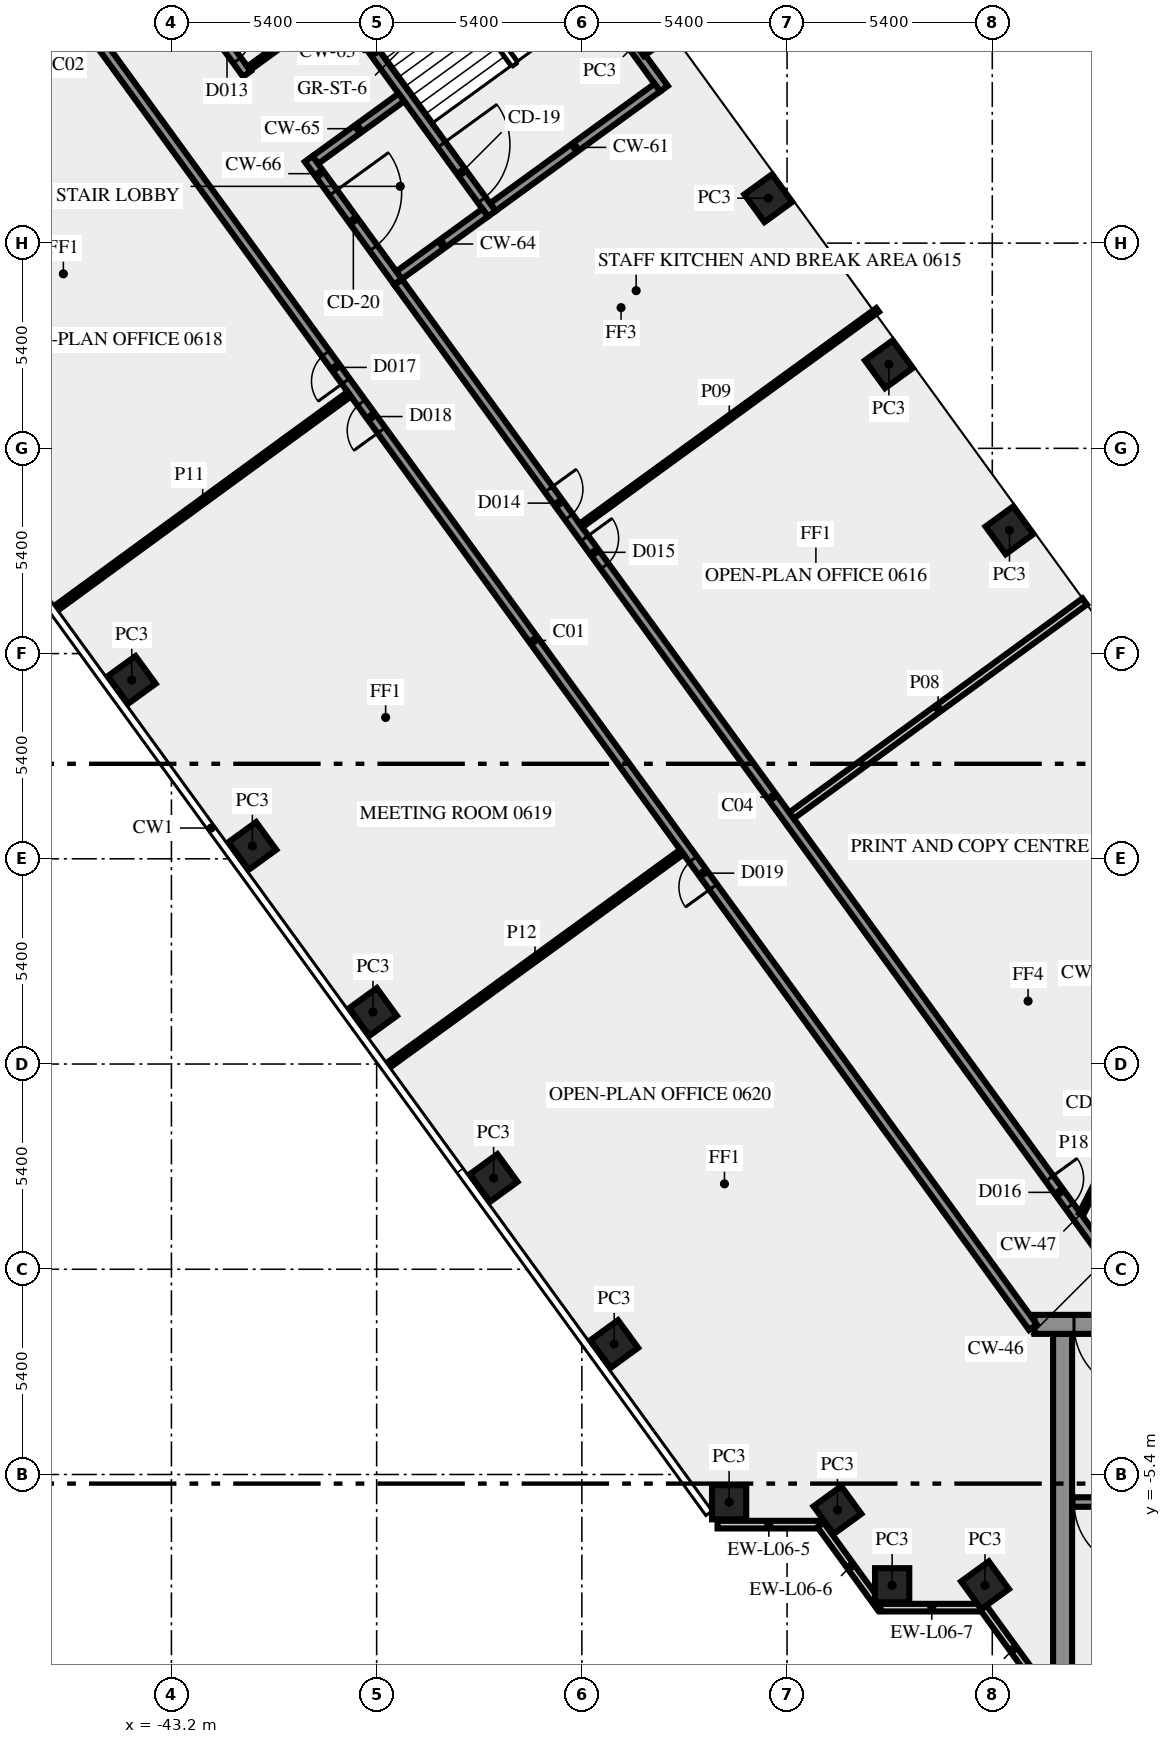
"""IFC4 building model, lengths in metres.
Left out: names, types, materials, properties, quantities, classifications, styles, units other than length and angle.
Written with IfcOpenShell. Run it as: python <this file> out.ifc"""

import sys

from ifc_helpers import new_model, si_unit, direction, frame, frame_2d, origin, origin_2d, place, context, subcontext, project, spatial, rectangle, extrude, element, fill, save


model = new_model("IFC4")
c1 = context("Model", 3, precision=1e-05, world=origin(), true_north=direction((0.0, 1.0)))
c2 = subcontext(c1, "Body", "Model", "MODEL_VIEW")
j1 = project(units=[si_unit("LENGTHUNIT", "METRE"), si_unit("PLANEANGLEUNIT", "RADIAN")], contexts=[c1])
p1 = place(None, origin())
s1 = spatial("IfcSite", under=j1, at=p1, CompositionType="ELEMENT")
p2 = place(p1, origin())
s2 = spatial("IfcBuilding", under=s1, at=p2, CompositionType="ELEMENT")
p3 = place(p2, frame((0.0, 0.0, 31.0)))
s3 = spatial("IfcBuildingStorey", under=s2, at=p3, CompositionType="ELEMENT", Elevation=31.0)
for number, where, z_axis, x_axis in (
    (1, (-21.147, 19.444, 0.0), (0.0, 0.0, 1.0), (-0.588, 0.809, 0.0)),
    (2, (-24.321, 23.812, 0.0), (0.0, 0.0, 1.0), (-0.588, 0.809, 0.0)),
    (3, (-27.495, 28.181, 0.0), (0.0, 0.0, 1.0), (-0.588, 0.809, 0.0)),
    (4, (-30.669, 32.55, 0.0), (0.0, 0.0, 1.0), (-0.588, 0.809, 0.0)),
    (5, (-44.244, 15.506, 0.0), (0.0, 0.0, 1.0), (0.588, -0.809, 0.0)),
    (6, (-41.07, 11.137, 0.0), (0.0, 0.0, 1.0), (0.588, -0.809, 0.0)),
    (7, (-37.896, 6.769, 0.0), (0.0, 0.0, 1.0), (0.588, -0.809, 0.0)),
    (8, (-34.722, 2.4, 0.0), (0.0, 0.0, 1.0), (0.588, -0.809, 0.0)),
    (9, (-31.548, -1.969, 0.0), (0.0, 0.0, 1.0), (0.588, -0.809, 0.0)),
    (10, (-28.525, -6.13, 0.0), (0.0, 0.0, 1.0), (1.0, 0.0, 0.0)),
    (11, (-25.674, -6.337, 0.0), (0.0, 0.0, 1.0), (0.588, -0.809, 0.0)),
    (12, (-24.235, -8.315, 0.0), (0.0, 0.0, 1.0), (1.0, 0.0, 0.0)),
    (13, (-21.792, -8.315, 0.0), (0.0, 0.0, 1.0), (0.588, -0.809, 0.0)),
):
    element("IfcColumn", number, at=place(p3, frame(where, z_axis=z_axis, x_axis=x_axis)), inside=s3, PredefinedType="COLUMN", context=c2, shape_type="SweptSolid", body=[
        extrude(rectangle(XDim=0.9, YDim=0.9, at=origin_2d()), origin(), (0.0, 0.0, 1.0), 3.65),
    ])
p4 = place(p3, frame((-28.83, -6.719, 0.0), z_axis=(0.0, 0.0, 1.0), x_axis=(1.0, 0.0, 0.0)))
e14 = element("IfcWall", 14, at=p4, inside=s3, PredefinedType="SOLIDWALL", context=c2, shape_type="SweptSolid", body=[
    extrude(rectangle(XDim=2.7, YDim=0.2, at=frame_2d((1.35, 0.0))), origin(), (0.0, 0.0, 1.0), 3.65),
])
p5 = place(p3, frame((-26.12, -6.724, 0.0), z_axis=(0.0, 0.0, 1.0), x_axis=(0.587720002413, -0.809064397168, 0.0)))
e15 = element("IfcWall", 15, at=p5, inside=s3, PredefinedType="SOLIDWALL", context=c2, shape_type="SweptSolid", body=[
    extrude(rectangle(XDim=2.7, YDim=0.2, at=frame_2d((1.35, 0.0))), origin(), (0.0, 0.0, 1.0), 3.65),
])
p6 = place(p3, frame((-24.543, -8.904, 0.0), z_axis=(0.0, 0.0, 1.0), x_axis=(1.0, 0.0, 0.0)))
e16 = element("IfcWall", 16, at=p6, inside=s3, PredefinedType="SOLIDWALL", context=c2, shape_type="SweptSolid", body=[
    extrude(rectangle(XDim=2.7, YDim=0.2, at=frame_2d((1.35, 0.0))), origin(), (0.0, 0.0, 1.0), 3.65),
])
p7 = place(p3, frame((-21.833, -8.909, 0.0), z_axis=(0.0, 0.0, 1.0), x_axis=(0.587766567315, -0.809030569476, 0.0)))
e17 = element("IfcWall", 17, at=p7, inside=s3, PredefinedType="SOLIDWALL", context=c2, shape_type="SweptSolid", body=[
    extrude(rectangle(XDim=2.688, YDim=0.2, at=frame_2d((1.344, 0.0))), origin(), (0.0, 0.0, 1.0), 3.65),
])
p8 = place(p3, frame((-19.75, -10.5, 0.0), z_axis=(0.0, 0.0, 1.0), x_axis=(0.0, 1.0, 0.0)))
e18 = element("IfcWall", 18, at=p8, inside=s3, PredefinedType="SHEAR", context=c2, shape_type="SweptSolid", body=[
    extrude(rectangle(XDim=8.8, YDim=0.5, at=frame_2d((4.4, 0.0))), origin(), (0.0, 0.0, 1.0), 3.65),
])
p9 = place(p3, frame((-11.45, -6.125, 0.0), z_axis=(0.0, 0.0, 1.0), x_axis=(-1.0, 0.0, 0.0)))
e19 = element("IfcWall", 19, at=p9, inside=s3, PredefinedType="SHEAR", context=c2, shape_type="SweptSolid", body=[
    extrude(rectangle(XDim=8.05, YDim=0.25, at=frame_2d((4.025, 0.0))), origin(), (0.0, 0.0, 1.0), 3.65),
])
p10 = place(p9, frame((6.2, 0.0, 0.0)))
e20 = element("IfcOpeningElement", 20, at=p10, cuts=e19, PredefinedType="OPENING", context=c2, shape_type="SweptSolid", body=[
    extrude(rectangle(XDim=1.8, YDim=2.1, at=frame_2d((0.9, 1.05))), frame((0.0, 0.135, 0.0), z_axis=(0.0, -1.0, 0.0), x_axis=(1.0, 0.0, 0.0)), (0.0, 0.0, 1.0), 0.27),
])
p11 = place(p3, frame((20.49, -1.45, 0.0), z_axis=(0.0, 0.0, 1.0), x_axis=(-1.0, 0.0, 0.0)))
e21 = element("IfcWall", 21, at=p11, inside=s3, PredefinedType="SHEAR", context=c2, shape_type="SweptSolid", body=[
    extrude(rectangle(XDim=40.98, YDim=0.5, at=frame_2d((20.49, 0.0))), origin(), (0.0, 0.0, 1.0), 3.65),
])
p12 = place(p11, frame((38.14, 0.0, 0.0)))
e22 = element("IfcOpeningElement", 22, at=p12, cuts=e21, PredefinedType="OPENING", context=c2, shape_type="SweptSolid", body=[
    extrude(rectangle(XDim=1.8, YDim=2.1, at=frame_2d((0.9, 1.05))), frame((0.0, 0.26, 0.0), z_axis=(0.0, -1.0, 0.0), x_axis=(1.0, 0.0, 0.0)), (0.0, 0.0, 1.0), 0.52),
])
p13 = place(p11, frame((36.728, 0.0, 0.0)))
e23 = element("IfcOpeningElement", 23, at=p13, cuts=e21, PredefinedType="OPENING", context=c2, shape_type="SweptSolid", body=[
    extrude(rectangle(XDim=0.8, YDim=2.1, at=frame_2d((0.4, 1.05))), frame((0.0, 0.26, 0.0), z_axis=(0.0, -1.0, 0.0), x_axis=(1.0, 0.0, 0.0)), (0.0, 0.0, 1.0), 0.52),
])
p14 = place(p11, frame((35.153, 0.0, 0.0)))
e24 = element("IfcOpeningElement", 24, at=p14, cuts=e21, PredefinedType="OPENING", context=c2, shape_type="SweptSolid", body=[
    extrude(rectangle(XDim=0.8, YDim=2.1, at=frame_2d((0.4, 1.05))), frame((0.0, 0.26, 0.0), z_axis=(0.0, -1.0, 0.0), x_axis=(1.0, 0.0, 0.0)), (0.0, 0.0, 1.0), 0.52),
])
p15 = place(p11, frame((32.94, 0.0, 0.0)))
e25 = element("IfcOpeningElement", 25, at=p15, cuts=e21, PredefinedType="OPENING", context=c2, shape_type="SweptSolid", body=[
    extrude(rectangle(XDim=0.9, YDim=2.1, at=frame_2d((0.45, 1.05))), frame((0.0, 0.26, 0.0), z_axis=(0.0, -1.0, 0.0), x_axis=(1.0, 0.0, 0.0)), (0.0, 0.0, 1.0), 0.52),
])
p16 = place(p11, frame((21.765, 0.0, 0.0)))
e26 = element("IfcOpeningElement", 26, at=p16, cuts=e21, PredefinedType="OPENING", context=c2, shape_type="SweptSolid", body=[
    extrude(rectangle(XDim=2.0, YDim=2.1, at=frame_2d((1.0, 1.05))), frame((0.0, 0.26, 0.0), z_axis=(0.0, -1.0, 0.0), x_axis=(1.0, 0.0, 0.0)), (0.0, 0.0, 1.0), 0.52),
])
p17 = place(p11, frame((7.14, 0.0, 0.0)))
e27 = element("IfcOpeningElement", 27, at=p17, cuts=e21, PredefinedType="OPENING", context=c2, shape_type="SweptSolid", body=[
    extrude(rectangle(XDim=0.9, YDim=2.1, at=frame_2d((0.45, 1.05))), frame((0.0, 0.26, 0.0), z_axis=(0.0, -1.0, 0.0), x_axis=(1.0, 0.0, 0.0)), (0.0, 0.0, 1.0), 0.52),
])
p18 = place(p11, frame((4.19, 0.0, 0.0)))
e28 = element("IfcOpeningElement", 28, at=p18, cuts=e21, PredefinedType="OPENING", context=c2, shape_type="SweptSolid", body=[
    extrude(rectangle(XDim=0.9, YDim=2.1, at=frame_2d((0.45, 1.05))), frame((0.0, 0.26, 0.0), z_axis=(0.0, -1.0, 0.0), x_axis=(1.0, 0.0, 0.0)), (0.0, 0.0, 1.0), 0.52),
])
p19 = place(p11, frame((1.04, 0.0, 0.0)))
e29 = element("IfcOpeningElement", 29, at=p19, cuts=e21, PredefinedType="OPENING", context=c2, shape_type="SweptSolid", body=[
    extrude(rectangle(XDim=1.8, YDim=2.1, at=frame_2d((0.9, 1.05))), frame((0.0, 0.26, 0.0), z_axis=(0.0, -1.0, 0.0), x_axis=(1.0, 0.0, 0.0)), (0.0, 0.0, 1.0), 0.52),
])
p20 = place(p3, frame((-30.24, 31.064, 0.0), z_axis=(0.0, 0.0, 1.0), x_axis=(-0.587795589702, 0.809009483706, 0.0)))
e30 = element("IfcWall", 30, at=p20, inside=s3, PredefinedType="SHEAR", context=c2, shape_type="SweptSolid", body=[
    extrude(rectangle(XDim=10.5, YDim=0.25, at=frame_2d((5.25, 0.0))), origin(), (0.0, 0.0, 1.0), 3.65),
])
p21 = place(p20, frame((2.15, 0.0, 1.0)))
e31 = element("IfcOpeningElement", 31, at=p21, cuts=e30, PredefinedType="OPENING", context=c2, shape_type="SweptSolid", body=[
    extrude(rectangle(XDim=1.2, YDim=1.2, at=frame_2d((0.6, 0.6))), frame((0.0, 0.135, 0.0), z_axis=(0.0, -1.0, 0.0), x_axis=(1.0, 0.0, 0.0)), (0.0, 0.0, 1.0), 0.27),
])
p22 = place(p3, frame((-30.414, 31.092, 0.0), z_axis=(0.0, 0.0, 1.0), x_axis=(-0.8089984606, -0.587810760999, 0.0)))
e32 = element("IfcWall", 32, at=p22, inside=s3, PredefinedType="SHEAR", context=c2, shape_type="SweptSolid", body=[
    extrude(rectangle(XDim=5.35, YDim=0.25, at=frame_2d((2.675, 0.0))), origin(), (0.0, 0.0, 1.0), 3.65),
])
p23 = place(p3, frame((-40.942, 36.267, 0.0), z_axis=(0.0, 0.0, 1.0), x_axis=(0.587795589702, -0.809009483706, 0.0)))
e33 = element("IfcWall", 33, at=p23, inside=s3, PredefinedType="SHEAR", context=c2, shape_type="SweptSolid", body=[
    extrude(rectangle(XDim=10.5, YDim=0.25, at=frame_2d((5.25, 0.0))), origin(), (0.0, 0.0, 1.0), 3.65),
])
p24 = place(p23, frame((8.25, 0.0, 0.0)))
e34 = element("IfcOpeningElement", 34, at=p24, cuts=e33, PredefinedType="OPENING", context=c2, shape_type="SweptSolid", body=[
    extrude(rectangle(XDim=1.8, YDim=2.1, at=frame_2d((0.9, 1.05))), frame((0.0, 0.135, 0.0), z_axis=(0.0, -1.0, 0.0), x_axis=(1.0, 0.0, 0.0)), (0.0, 0.0, 1.0), 0.27),
])
for number, where, z_axis, x_axis in (
    (35, (-34.945, 27.8, 0.0), (0.0, 0.0, 1.0), (-0.809, -0.588, 0.0)),
    (36, (-37.149, 30.834, 0.0), (0.0, 0.0, 1.0), (-0.809, -0.588, 0.0)),
):
    element("IfcWall", number, at=place(p3, frame(where, z_axis=z_axis, x_axis=x_axis)), inside=s3, PredefinedType="SHEAR", context=c2, shape_type="SweptSolid", body=[
        extrude(rectangle(XDim=2.8, YDim=0.25, at=frame_2d((1.4, 0.0))), origin(), (0.0, 0.0, 1.0), 3.65),
    ])
p25 = place(p3, frame((-39.589, 29.216, 0.0), z_axis=(0.0, 0.0, 1.0), x_axis=(0.587772420479, -0.809026317077, 0.0)))
e37 = element("IfcWall", 37, at=p25, inside=s3, PredefinedType="SHEAR", context=c2, shape_type="SweptSolid", body=[
    extrude(rectangle(XDim=4.0, YDim=0.25, at=frame_2d((2.0, 0.0))), origin(), (0.0, 0.0, 1.0), 3.65),
])
p26 = place(p25, frame((1.1, 0.0, 0.0)))
e38 = element("IfcOpeningElement", 38, at=p26, cuts=e37, PredefinedType="OPENING", context=c2, shape_type="SweptSolid", body=[
    extrude(rectangle(XDim=1.8, YDim=2.1, at=frame_2d((0.9, 1.05))), frame((0.0, 0.135, 0.0), z_axis=(0.0, -1.0, 0.0), x_axis=(1.0, 0.0, 0.0)), (0.0, 0.0, 1.0), 0.27),
])
p27 = place(p3, frame((-20.531, -1.523, 0.0), z_axis=(0.0, 0.0, 1.0), x_axis=(-0.587784593204, 0.809017473231, 0.0)))
e39 = element("IfcWall", 39, at=p27, inside=s3, PredefinedType="SOLIDWALL", context=c2, shape_type="SweptSolid", body=[
    extrude(rectangle(XDim=44.67, YDim=0.25, at=frame_2d((22.335, 0.0))), origin(), (0.0, 0.0, 1.0), 3.65),
])
p28 = place(p27, frame((30.765, 0.0, 0.0)))
e40 = element("IfcOpeningElement", 40, at=p28, cuts=e39, PredefinedType="OPENING", context=c2, shape_type="SweptSolid", body=[
    extrude(rectangle(XDim=0.9, YDim=2.1, at=frame_2d((0.45, 1.05))), frame((0.0, 0.135, 0.0), z_axis=(0.0, -1.0, 0.0), x_axis=(1.0, 0.0, 0.0)), (0.0, 0.0, 1.0), 0.27),
])
p29 = place(p27, frame((14.316, 0.0, 0.0)))
e41 = element("IfcOpeningElement", 41, at=p29, cuts=e39, PredefinedType="OPENING", context=c2, shape_type="SweptSolid", body=[
    extrude(rectangle(XDim=0.9, YDim=2.1, at=frame_2d((0.45, 1.05))), frame((0.0, 0.135, 0.0), z_axis=(0.0, -1.0, 0.0), x_axis=(1.0, 0.0, 0.0)), (0.0, 0.0, 1.0), 0.27),
])
p30 = place(p27, frame((29.166, 0.0, 0.0)))
e42 = element("IfcOpeningElement", 42, at=p30, cuts=e39, PredefinedType="OPENING", context=c2, shape_type="SweptSolid", body=[
    extrude(rectangle(XDim=0.9, YDim=2.1, at=frame_2d((0.45, 1.05))), frame((0.0, 0.135, 0.0), z_axis=(0.0, -1.0, 0.0), x_axis=(1.0, 0.0, 0.0)), (0.0, 0.0, 1.0), 0.27),
])
p31 = place(p3, frame((-44.497, 35.971, 0.0), z_axis=(0.0, 0.0, 1.0), x_axis=(0.587742866856, -0.809047787501, 0.0)))
e43 = element("IfcWall", 43, at=p31, inside=s3, PredefinedType="SOLIDWALL", context=c2, shape_type="SweptSolid", body=[
    extrude(rectangle(XDim=5.586, YDim=0.25, at=frame_2d((2.793, 0.0))), origin(), (0.0, 0.0, 1.0), 3.65),
])
p32 = place(p31, frame((4.245, 0.0, 0.0)))
e44 = element("IfcOpeningElement", 44, at=p32, cuts=e43, PredefinedType="OPENING", context=c2, shape_type="SweptSolid", body=[
    extrude(rectangle(XDim=0.9, YDim=2.1, at=frame_2d((0.45, 1.05))), frame((0.0, 0.135, 0.0), z_axis=(0.0, -1.0, 0.0), x_axis=(1.0, 0.0, 0.0)), (0.0, 0.0, 1.0), 0.27),
])
p33 = place(p3, frame((-37.232, 25.972, 0.0), z_axis=(0.0, 0.0, 1.0), x_axis=(0.587786323093, -0.809016216391, 0.0)))
e45 = element("IfcWall", 45, at=p33, inside=s3, PredefinedType="SOLIDWALL", context=c2, shape_type="SweptSolid", body=[
    extrude(rectangle(XDim=33.493, YDim=0.25, at=frame_2d((16.747, 0.0))), origin(), (0.0, 0.0, 1.0), 3.65),
])
p34 = place(p33, frame((8.335, 0.0, 0.0)))
e46 = element("IfcOpeningElement", 46, at=p34, cuts=e45, PredefinedType="OPENING", context=c2, shape_type="SweptSolid", body=[
    extrude(rectangle(XDim=0.9, YDim=2.1, at=frame_2d((0.45, 1.05))), frame((0.0, 0.135, 0.0), z_axis=(0.0, -1.0, 0.0), x_axis=(1.0, 0.0, 0.0)), (0.0, 0.0, 1.0), 0.27),
])
p35 = place(p33, frame((29.152, 0.0, 0.0)))
e47 = element("IfcOpeningElement", 47, at=p35, cuts=e45, PredefinedType="OPENING", context=c2, shape_type="SweptSolid", body=[
    extrude(rectangle(XDim=0.9, YDim=2.1, at=frame_2d((0.45, 1.05))), frame((0.0, 0.135, 0.0), z_axis=(0.0, -1.0, 0.0), x_axis=(1.0, 0.0, 0.0)), (0.0, 0.0, 1.0), 0.27),
])
p36 = place(p33, frame((6.735, 0.0, 0.0)))
e48 = element("IfcOpeningElement", 48, at=p36, cuts=e45, PredefinedType="OPENING", context=c2, shape_type="SweptSolid", body=[
    extrude(rectangle(XDim=0.9, YDim=2.1, at=frame_2d((0.45, 1.05))), frame((0.0, 0.135, 0.0), z_axis=(0.0, -1.0, 0.0), x_axis=(1.0, 0.0, 0.0)), (0.0, 0.0, 1.0), 0.27),
])
p37 = place(p3, frame((-26.882, 11.94, 0.0), z_axis=(0.0, 0.0, 1.0), x_axis=(0.807664588563, 0.589642190131, 0.0)))
e49 = element("IfcWall", 49, at=p37, inside=s3, PredefinedType="SOLIDWALL", context=c2, shape_type="SweptSolid", body=[
    extrude(rectangle(XDim=9.55, YDim=0.2, at=frame_2d((4.775, 0.0))), origin(), (0.0, 0.0, 1.0), 2.75),
])
p38 = place(p3, frame((-24.618, 25.242, 0.0), z_axis=(0.0, 0.0, 1.0), x_axis=(-0.809002920164, -0.587804623294, 0.0)))
e50 = element("IfcWall", 50, at=p38, inside=s3, PredefinedType="PARTITIONING", context=c2, shape_type="SweptSolid", body=[
    extrude(rectangle(XDim=9.651, YDim=0.12, at=frame_2d((4.825, 0.0))), origin(), (0.0, 0.0, 1.0), 2.75),
])
p39 = place(p3, frame((-46.234, 17.394, 0.0), z_axis=(0.0, 0.0, 1.0), x_axis=(0.807606997933, 0.589721067023, 0.0)))
e51 = element("IfcWall", 51, at=p39, inside=s3, PredefinedType="PARTITIONING", context=c2, shape_type="SweptSolid", body=[
    extrude(rectangle(XDim=9.55, YDim=0.15, at=frame_2d((4.775, 0.0))), origin(), (0.0, 0.0, 1.0), 2.75),
])
p40 = place(p3, frame((-29.769, 10.98, 0.0), z_axis=(0.0, 0.0, 1.0), x_axis=(-0.809048817734, -0.587741448702, 0.0)))
e52 = element("IfcWall", 52, at=p40, inside=s3, PredefinedType="PARTITIONING", context=c2, shape_type="SweptSolid", body=[
    extrude(rectangle(XDim=9.55, YDim=0.15, at=frame_2d((4.775, 0.0))), origin(), (0.0, 0.0, 1.0), 2.75),
])
p41 = place(p3, frame((-41.166, 31.599, 0.0), z_axis=(0.0, 0.0, 1.0), x_axis=(0.809090262332, 0.587684394381, 0.0)))
e53 = element("IfcWall", 53, at=p41, inside=s3, PredefinedType="PARTITIONING", context=c2, shape_type="SweptSolid", body=[
    extrude(rectangle(XDim=2.801, YDim=0.12, at=frame_2d((1.4, 0.0))), origin(), (0.0, 0.0, 1.0), 3.65),
])
p42 = place(p3, frame((-19.261, 1.45, 0.0), z_axis=(0.0, 0.0, 1.0), x_axis=(0.453950796792, 0.891026752736, 0.0)))
e54 = element("IfcWall", 54, at=p42, inside=s3, PredefinedType="PARTITIONING", context=c2, shape_type="SweptSolid", body=[
    extrude(rectangle(XDim=2.778, YDim=0.12, at=frame_2d((1.389, 0.0))), origin(), (0.0, 0.0, 1.0), 3.65),
])
p43 = place(p10, origin())
e55 = element("IfcDoor", 55, at=p43, inside=s3, OperationType="DOUBLE_DOOR_SINGLE_SWING", PredefinedType="DOOR", context=c2, shape_type="SweptSolid", body=[
    extrude(rectangle(XDim=1.8, YDim=2.1, at=frame_2d((0.9, 1.05))), frame((0.0, 0.025, 0.0), z_axis=(0.0, -1.0, 0.0), x_axis=(1.0, 0.0, 0.0)), (0.0, 0.0, 1.0), 0.05),
])
fill(e20, e55)
p44 = place(p12, origin())
e56 = element("IfcDoor", 56, at=p44, inside=s3, OperationType="DOUBLE_DOOR_SINGLE_SWING", PredefinedType="DOOR", context=c2, shape_type="SweptSolid", body=[
    extrude(rectangle(XDim=1.8, YDim=2.1, at=frame_2d((0.9, 1.05))), frame((0.0, 0.025, 0.0), z_axis=(0.0, -1.0, 0.0), x_axis=(1.0, 0.0, 0.0)), (0.0, 0.0, 1.0), 0.05),
])
fill(e22, e56)
p45 = place(p24, origin())
e57 = element("IfcDoor", 57, at=p45, inside=s3, OperationType="DOUBLE_DOOR_SINGLE_SWING", PredefinedType="DOOR", context=c2, shape_type="SweptSolid", body=[
    extrude(rectangle(XDim=1.8, YDim=2.1, at=frame_2d((0.9, 1.05))), frame((0.0, 0.025, 0.0), z_axis=(0.0, -1.0, 0.0), x_axis=(1.0, 0.0, 0.0)), (0.0, 0.0, 1.0), 0.05),
])
fill(e34, e57)
p46 = place(p26, origin())
e58 = element("IfcDoor", 58, at=p46, inside=s3, OperationType="DOUBLE_DOOR_SINGLE_SWING", PredefinedType="DOOR", context=c2, shape_type="SweptSolid", body=[
    extrude(rectangle(XDim=1.8, YDim=2.1, at=frame_2d((0.9, 1.05))), frame((0.0, 0.025, 0.0), z_axis=(0.0, -1.0, 0.0), x_axis=(1.0, 0.0, 0.0)), (0.0, 0.0, 1.0), 0.05),
])
fill(e38, e58)
p47 = place(p32, origin())
e59 = element("IfcDoor", 59, at=p47, inside=s3, OperationType="SINGLE_SWING_RIGHT", PredefinedType="DOOR", context=c2, shape_type="SweptSolid", body=[
    extrude(rectangle(XDim=0.9, YDim=2.1, at=frame_2d((0.45, 1.05))), frame((0.0, 0.025, 0.0), z_axis=(0.0, -1.0, 0.0), x_axis=(1.0, 0.0, 0.0)), (0.0, 0.0, 1.0), 0.05),
])
fill(e44, e59)
p48 = place(p34, origin())
e60 = element("IfcDoor", 60, at=p48, inside=s3, OperationType="SINGLE_SWING_LEFT", PredefinedType="DOOR", context=c2, shape_type="SweptSolid", body=[
    extrude(rectangle(XDim=0.9, YDim=2.1, at=frame_2d((0.45, 1.05))), frame((0.0, 0.025, 0.0), z_axis=(0.0, -1.0, 0.0), x_axis=(1.0, 0.0, 0.0)), (0.0, 0.0, 1.0), 0.05),
])
fill(e46, e60)
p49 = place(p28, origin())
e61 = element("IfcDoor", 61, at=p49, inside=s3, OperationType="SINGLE_SWING_LEFT", PredefinedType="DOOR", context=c2, shape_type="SweptSolid", body=[
    extrude(rectangle(XDim=0.9, YDim=2.1, at=frame_2d((0.45, 1.05))), frame((0.0, 0.025, 0.0), z_axis=(0.0, -1.0, 0.0), x_axis=(1.0, 0.0, 0.0)), (0.0, 0.0, 1.0), 0.05),
])
fill(e40, e61)
p50 = place(p29, origin())
e62 = element("IfcDoor", 62, at=p50, inside=s3, OperationType="SINGLE_SWING_RIGHT", PredefinedType="DOOR", context=c2, shape_type="SweptSolid", body=[
    extrude(rectangle(XDim=0.9, YDim=2.1, at=frame_2d((0.45, 1.05))), frame((0.0, 0.025, 0.0), z_axis=(0.0, -1.0, 0.0), x_axis=(1.0, 0.0, 0.0)), (0.0, 0.0, 1.0), 0.05),
])
fill(e41, e62)
p51 = place(p30, origin())
e63 = element("IfcDoor", 63, at=p51, inside=s3, OperationType="SINGLE_SWING_RIGHT", PredefinedType="DOOR", context=c2, shape_type="SweptSolid", body=[
    extrude(rectangle(XDim=0.9, YDim=2.1, at=frame_2d((0.45, 1.05))), frame((0.0, 0.025, 0.0), z_axis=(0.0, -1.0, 0.0), x_axis=(1.0, 0.0, 0.0)), (0.0, 0.0, 1.0), 0.05),
])
fill(e42, e63)
p52 = place(p35, origin())
e64 = element("IfcDoor", 64, at=p52, inside=s3, OperationType="SINGLE_SWING_RIGHT", PredefinedType="DOOR", context=c2, shape_type="SweptSolid", body=[
    extrude(rectangle(XDim=0.9, YDim=2.1, at=frame_2d((0.45, 1.05))), frame((0.0, 0.025, 0.0), z_axis=(0.0, -1.0, 0.0), x_axis=(1.0, 0.0, 0.0)), (0.0, 0.0, 1.0), 0.05),
])
fill(e47, e64)
p53 = place(p36, origin())
e65 = element("IfcDoor", 65, at=p53, inside=s3, OperationType="SINGLE_SWING_RIGHT", PredefinedType="DOOR", context=c2, shape_type="SweptSolid", body=[
    extrude(rectangle(XDim=0.9, YDim=2.1, at=frame_2d((0.45, 1.05))), frame((0.0, 0.025, 0.0), z_axis=(0.0, -1.0, 0.0), x_axis=(1.0, 0.0, 0.0)), (0.0, 0.0, 1.0), 0.05),
])
fill(e48, e65)
save(model, sys.argv[1])
